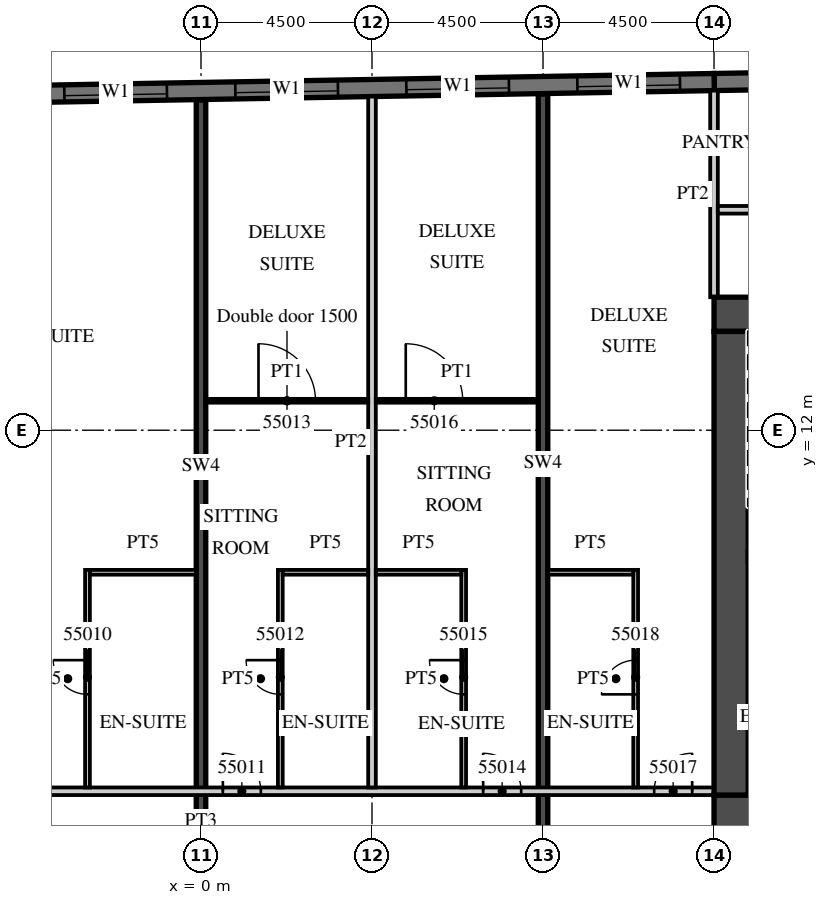
"""IFC4 building model, lengths in metres.
Left out: names, types, materials, properties, quantities, classifications, styles, units other than length and angle.
Written with IfcOpenShell. Run it as: python <this file> out.ifc"""

import sys

from ifc_helpers import new_model, si_unit, direction, frame, frame_2d, origin, place, context, subcontext, project, spatial, rectangle, extrude, element, fill, save


model = new_model("IFC4")
c1 = context("Model", 3, precision=1e-05, world=origin(), true_north=direction((0.0, 1.0)))
c2 = subcontext(c1, "Body", "Model", "MODEL_VIEW")
j1 = project(units=[si_unit("LENGTHUNIT", "METRE"), si_unit("PLANEANGLEUNIT", "RADIAN")], contexts=[c1])
p1 = place(None, origin())
s1 = spatial("IfcSite", under=j1, at=p1, CompositionType="ELEMENT")
p2 = place(p1, origin())
s2 = spatial("IfcBuilding", under=s1, at=p2, CompositionType="ELEMENT")
p3 = place(p2, frame((0.0, 0.0, 227.6)))
s3 = spatial("IfcBuildingStorey", under=s2, at=p3, CompositionType="ELEMENT", Elevation=227.6)
p4 = place(p3, frame((0.0, 1.4, 0.0), z_axis=(0.0, 0.0, 1.0), x_axis=(0.0, 1.0, 0.0)))
e1 = element("IfcWall", 1, at=p4, inside=s3, PredefinedType="SHEAR", context=c2, shape_type="SweptSolid", body=[
    extrude(rectangle(XDim=19.289, YDim=0.25, at=frame_2d((9.644, 0.0))), origin(), (0.0, 0.0, 1.0), 3.3),
])
p5 = place(p3, frame((9.0, 1.4, 0.0), z_axis=(0.0, 0.0, 1.0), x_axis=(0.0, 1.0, 0.0)))
e2 = element("IfcWall", 2, at=p5, inside=s3, PredefinedType="SHEAR", context=c2, shape_type="SweptSolid", body=[
    extrude(rectangle(XDim=19.446, YDim=0.25, at=frame_2d((9.723, 0.0))), origin(), (0.0, 0.0, 1.0), 3.3),
])
p6 = place(p3, frame((31.504, 21.476, 0.0), z_axis=(0.0, 0.0, 1.0), x_axis=(-0.999847677887, -0.017453395744, 0.0)))
e3 = element("IfcWall", 3, at=p6, inside=s3, PredefinedType="SOLIDWALL", context=c2, shape_type="SweptSolid", body=[
    extrude(rectangle(XDim=18.003, YDim=0.45, at=frame_2d((9.001, 0.0))), origin(), (0.0, 0.0, 1.0), 3.02),
])
p7 = place(p3, frame((13.504, 21.161, 0.0), z_axis=(0.0, 0.0, 1.0), x_axis=(-0.999847763257, -0.017448504532, 0.0)))
e4 = element("IfcWall", 4, at=p7, inside=s3, PredefinedType="SOLIDWALL", context=c2, shape_type="SweptSolid", body=[
    extrude(rectangle(XDim=46.859, YDim=0.45, at=frame_2d((23.43, 0.0))), origin(), (0.0, 0.0, 1.0), 3.02),
])
p8 = place(p7, frame((0.9, 0.0, 0.45)))
e5 = element("IfcOpeningElement", 5, at=p8, cuts=e4, PredefinedType="OPENING", context=c2, shape_type="SweptSolid", body=[
    extrude(rectangle(XDim=2.7, YDim=2.25, at=frame_2d((1.35, 1.125))), frame((0.0, 0.235, 0.0), z_axis=(0.0, -1.0, 0.0), x_axis=(1.0, 0.0, 0.0)), (0.0, 0.0, 1.0), 0.47),
])
p9 = place(p7, frame((5.401, 0.0, 0.45)))
e6 = element("IfcOpeningElement", 6, at=p9, cuts=e4, PredefinedType="OPENING", context=c2, shape_type="SweptSolid", body=[
    extrude(rectangle(XDim=2.7, YDim=2.25, at=frame_2d((1.35, 1.125))), frame((0.0, 0.235, 0.0), z_axis=(0.0, -1.0, 0.0), x_axis=(1.0, 0.0, 0.0)), (0.0, 0.0, 1.0), 0.47),
])
p10 = place(p7, frame((9.902, 0.0, 0.45)))
e7 = element("IfcOpeningElement", 7, at=p10, cuts=e4, PredefinedType="OPENING", context=c2, shape_type="SweptSolid", body=[
    extrude(rectangle(XDim=2.7, YDim=2.25, at=frame_2d((1.35, 1.125))), frame((0.0, 0.235, 0.0), z_axis=(0.0, -1.0, 0.0), x_axis=(1.0, 0.0, 0.0)), (0.0, 0.0, 1.0), 0.47),
])
p11 = place(p7, frame((14.402, 0.0, 0.45)))
e8 = element("IfcOpeningElement", 8, at=p11, cuts=e4, PredefinedType="OPENING", context=c2, shape_type="SweptSolid", body=[
    extrude(rectangle(XDim=2.7, YDim=2.25, at=frame_2d((1.35, 1.125))), frame((0.0, 0.235, 0.0), z_axis=(0.0, -1.0, 0.0), x_axis=(1.0, 0.0, 0.0)), (0.0, 0.0, 1.0), 0.47),
])
p12 = place(p7, frame((18.903, 0.0, 0.45)))
e9 = element("IfcOpeningElement", 9, at=p12, cuts=e4, PredefinedType="OPENING", context=c2, shape_type="SweptSolid", body=[
    extrude(rectangle(XDim=2.7, YDim=2.25, at=frame_2d((1.35, 1.125))), frame((0.0, 0.235, 0.0), z_axis=(0.0, -1.0, 0.0), x_axis=(1.0, 0.0, 0.0)), (0.0, 0.0, 1.0), 0.47),
])
p13 = place(p7, frame((23.404, 0.0, 0.45)))
e10 = element("IfcOpeningElement", 10, at=p13, cuts=e4, PredefinedType="OPENING", context=c2, shape_type="SweptSolid", body=[
    extrude(rectangle(XDim=2.7, YDim=2.25, at=frame_2d((1.35, 1.125))), frame((0.0, 0.235, 0.0), z_axis=(0.0, -1.0, 0.0), x_axis=(1.0, 0.0, 0.0)), (0.0, 0.0, 1.0), 0.47),
])
p14 = place(p7, frame((27.904, 0.0, 0.45)))
e11 = element("IfcOpeningElement", 11, at=p14, cuts=e4, PredefinedType="OPENING", context=c2, shape_type="SweptSolid", body=[
    extrude(rectangle(XDim=2.7, YDim=2.25, at=frame_2d((1.35, 1.125))), frame((0.0, 0.235, 0.0), z_axis=(0.0, -1.0, 0.0), x_axis=(1.0, 0.0, 0.0)), (0.0, 0.0, 1.0), 0.47),
])
p15 = place(p7, frame((32.405, 0.0, 0.45)))
e12 = element("IfcOpeningElement", 12, at=p15, cuts=e4, PredefinedType="OPENING", context=c2, shape_type="SweptSolid", body=[
    extrude(rectangle(XDim=2.7, YDim=2.25, at=frame_2d((1.35, 1.125))), frame((0.0, 0.235, 0.0), z_axis=(0.0, -1.0, 0.0), x_axis=(1.0, 0.0, 0.0)), (0.0, 0.0, 1.0), 0.47),
])
p16 = place(p7, frame((36.906, 0.0, 0.45)))
e13 = element("IfcOpeningElement", 13, at=p16, cuts=e4, PredefinedType="OPENING", context=c2, shape_type="SweptSolid", body=[
    extrude(rectangle(XDim=2.7, YDim=2.25, at=frame_2d((1.35, 1.125))), frame((0.0, 0.235, 0.0), z_axis=(0.0, -1.0, 0.0), x_axis=(1.0, 0.0, 0.0)), (0.0, 0.0, 1.0), 0.47),
])
p17 = place(p7, frame((41.406, 0.0, 0.45)))
e14 = element("IfcOpeningElement", 14, at=p17, cuts=e4, PredefinedType="OPENING", context=c2, shape_type="SweptSolid", body=[
    extrude(rectangle(XDim=2.7, YDim=2.25, at=frame_2d((1.35, 1.125))), frame((0.0, 0.235, 0.0), z_axis=(0.0, -1.0, 0.0), x_axis=(1.0, 0.0, 0.0)), (0.0, 0.0, 1.0), 0.47),
])
p18 = place(p3, frame((13.5, 15.5, 0.0), z_axis=(0.0, 0.0, 1.0), x_axis=(0.0, 1.0, 0.0)))
e15 = element("IfcWall", 15, at=p18, inside=s3, PredefinedType="PARTITIONING", context=c2, shape_type="SweptSolid", body=[
    extrude(rectangle(XDim=5.436, YDim=0.2, at=frame_2d((2.718, 0.0))), origin(), (0.0, 0.0, 1.0), 3.02),
])
p19 = place(p3, frame((-13.5, 2.5, 0.0), z_axis=(0.0, 0.0, 1.0), x_axis=(1.0, 0.0, 0.0)))
e16 = element("IfcWall", 16, at=p19, inside=s3, PredefinedType="PARTITIONING", context=c2, shape_type="SweptSolid", body=[
    extrude(rectangle(XDim=27.0, YDim=0.2, at=frame_2d((13.5, 0.0))), origin(), (0.0, 0.0, 1.0), 3.02),
])
p20 = place(p19, frame((2.925, 0.0, 0.0)))
e17 = element("IfcOpeningElement", 17, at=p20, cuts=e16, PredefinedType="OPENING", context=c2, shape_type="SweptSolid", body=[
    extrude(rectangle(XDim=1.0, YDim=2.1, at=frame_2d((0.5, 1.05))), frame((0.0, 0.11, 0.0), z_axis=(0.0, -1.0, 0.0), x_axis=(1.0, 0.0, 0.0)), (0.0, 0.0, 1.0), 0.22),
])
p21 = place(p19, frame((6.938, 0.0, 0.0)))
e18 = element("IfcOpeningElement", 18, at=p21, cuts=e16, PredefinedType="OPENING", context=c2, shape_type="SweptSolid", body=[
    extrude(rectangle(XDim=1.2, YDim=2.1, at=frame_2d((0.6, 1.05))), frame((0.0, 0.11, 0.0), z_axis=(0.0, -1.0, 0.0), x_axis=(1.0, 0.0, 0.0)), (0.0, 0.0, 1.0), 0.22),
])
p22 = place(p19, frame((14.075, 0.0, 0.0)))
e19 = element("IfcOpeningElement", 19, at=p22, cuts=e16, PredefinedType="OPENING", context=c2, shape_type="SweptSolid", body=[
    extrude(rectangle(XDim=1.0, YDim=2.1, at=frame_2d((0.5, 1.05))), frame((0.0, 0.11, 0.0), z_axis=(0.0, -1.0, 0.0), x_axis=(1.0, 0.0, 0.0)), (0.0, 0.0, 1.0), 0.22),
])
p23 = place(p19, frame((20.925, 0.0, 0.0)))
e20 = element("IfcOpeningElement", 20, at=p23, cuts=e16, PredefinedType="OPENING", context=c2, shape_type="SweptSolid", body=[
    extrude(rectangle(XDim=1.0, YDim=2.1, at=frame_2d((0.5, 1.05))), frame((0.0, 0.11, 0.0), z_axis=(0.0, -1.0, 0.0), x_axis=(1.0, 0.0, 0.0)), (0.0, 0.0, 1.0), 0.22),
])
p24 = place(p19, frame((25.425, 0.0, 0.0)))
e21 = element("IfcOpeningElement", 21, at=p24, cuts=e16, PredefinedType="OPENING", context=c2, shape_type="SweptSolid", body=[
    extrude(rectangle(XDim=1.0, YDim=2.1, at=frame_2d((0.5, 1.05))), frame((0.0, 0.11, 0.0), z_axis=(0.0, -1.0, 0.0), x_axis=(1.0, 0.0, 0.0)), (0.0, 0.0, 1.0), 0.22),
])
p25 = place(p3, frame((-2.987, 2.6, 0.0), z_axis=(0.0, 0.0, 1.0), x_axis=(0.0, 1.0, 0.0)))
e22 = element("IfcWall", 22, at=p25, inside=s3, PredefinedType="PARTITIONING", context=c2, shape_type="SweptSolid", body=[
    extrude(rectangle(XDim=5.725, YDim=0.125, at=frame_2d((2.862, 0.0))), origin(), (0.0, 0.0, 1.0), 3.02),
])
p26 = place(p25, frame((2.45, 0.0, 0.0)))
e23 = element("IfcOpeningElement", 23, at=p26, cuts=e22, PredefinedType="OPENING", context=c2, shape_type="SweptSolid", body=[
    extrude(rectangle(XDim=0.9, YDim=2.1, at=frame_2d((0.45, 1.05))), frame((0.0, 0.073, 0.0), z_axis=(0.0, -1.0, 0.0), x_axis=(1.0, 0.0, 0.0)), (0.0, 0.0, 1.0), 0.145),
])
p27 = place(p3, frame((-2.925, 8.262, 0.0), z_axis=(0.0, 0.0, 1.0), x_axis=(1.0, 0.0, 0.0)))
e24 = element("IfcWall", 24, at=p27, inside=s3, PredefinedType="PARTITIONING", context=c2, shape_type="SweptSolid", body=[
    extrude(rectangle(XDim=2.8, YDim=0.125, at=frame_2d((1.4, 0.0))), origin(), (0.0, 0.0, 1.0), 3.02),
])
p28 = place(p3, frame((4.5, 2.6, 0.0), z_axis=(0.0, 0.0, 1.0), x_axis=(0.0, 1.0, 0.0)))
e25 = element("IfcWall", 25, at=p28, inside=s3, PredefinedType="PARTITIONING", context=c2, shape_type="SweptSolid", body=[
    extrude(rectangle(XDim=18.179, YDim=0.2, at=frame_2d((9.089, 0.0))), origin(), (0.0, 0.0, 1.0), 3.02),
])
p29 = place(p3, frame((2.087, 2.6, 0.0), z_axis=(0.0, 0.0, 1.0), x_axis=(0.0, 1.0, 0.0)))
e26 = element("IfcWall", 26, at=p29, inside=s3, PredefinedType="PARTITIONING", context=c2, shape_type="SweptSolid", body=[
    extrude(rectangle(XDim=5.725, YDim=0.125, at=frame_2d((2.862, 0.0))), origin(), (0.0, 0.0, 1.0), 3.02),
])
p30 = place(p29, frame((2.45, 0.0, 0.0)))
e27 = element("IfcOpeningElement", 27, at=p30, cuts=e26, PredefinedType="OPENING", context=c2, shape_type="SweptSolid", body=[
    extrude(rectangle(XDim=0.9, YDim=2.1, at=frame_2d((0.45, 1.05))), frame((0.0, 0.073, 0.0), z_axis=(0.0, -1.0, 0.0), x_axis=(1.0, 0.0, 0.0)), (0.0, 0.0, 1.0), 0.145),
])
p31 = place(p3, frame((2.15, 8.262, 0.0), z_axis=(0.0, 0.0, 1.0), x_axis=(1.0, 0.0, 0.0)))
e28 = element("IfcWall", 28, at=p31, inside=s3, PredefinedType="PARTITIONING", context=c2, shape_type="SweptSolid", body=[
    extrude(rectangle(XDim=2.25, YDim=0.125, at=frame_2d((1.125, 0.0))), origin(), (0.0, 0.0, 1.0), 3.02),
])
p32 = place(p3, frame((0.125, 12.775, 0.0), z_axis=(0.0, 0.0, 1.0), x_axis=(1.0, 0.0, 0.0)))
e29 = element("IfcWall", 29, at=p32, inside=s3, PredefinedType="PARTITIONING", context=c2, shape_type="SweptSolid", body=[
    extrude(rectangle(XDim=4.275, YDim=0.1, at=frame_2d((2.137, 0.0))), origin(), (0.0, 0.0, 1.0), 3.02),
])
p33 = place(p32, frame((1.388, 0.0, 0.0)))
e30 = element("IfcOpeningElement", 30, at=p33, cuts=e29, PredefinedType="OPENING", context=c2, shape_type="SweptSolid", body=[
    extrude(rectangle(XDim=1.5, YDim=2.1, at=frame_2d((0.75, 1.05))), frame((0.0, 0.06, 0.0), z_axis=(0.0, -1.0, 0.0), x_axis=(1.0, 0.0, 0.0)), (0.0, 0.0, 1.0), 0.12),
])
p34 = place(p3, frame((6.912, 2.6, 0.0), z_axis=(0.0, 0.0, 1.0), x_axis=(0.0, 1.0, 0.0)))
e31 = element("IfcWall", 31, at=p34, inside=s3, PredefinedType="PARTITIONING", context=c2, shape_type="SweptSolid", body=[
    extrude(rectangle(XDim=5.725, YDim=0.125, at=frame_2d((2.862, 0.0))), origin(), (0.0, 0.0, 1.0), 3.02),
])
p35 = place(p34, frame((2.45, 0.0, 0.0)))
e32 = element("IfcOpeningElement", 32, at=p35, cuts=e31, PredefinedType="OPENING", context=c2, shape_type="SweptSolid", body=[
    extrude(rectangle(XDim=0.9, YDim=2.1, at=frame_2d((0.45, 1.05))), frame((0.0, 0.073, 0.0), z_axis=(0.0, -1.0, 0.0), x_axis=(1.0, 0.0, 0.0)), (0.0, 0.0, 1.0), 0.145),
])
p36 = place(p3, frame((4.6, 8.262, 0.0), z_axis=(0.0, 0.0, 1.0), x_axis=(1.0, 0.0, 0.0)))
e33 = element("IfcWall", 33, at=p36, inside=s3, PredefinedType="PARTITIONING", context=c2, shape_type="SweptSolid", body=[
    extrude(rectangle(XDim=2.25, YDim=0.125, at=frame_2d((1.125, 0.0))), origin(), (0.0, 0.0, 1.0), 3.02),
])
p37 = place(p3, frame((4.6, 12.775, 0.0), z_axis=(0.0, 0.0, 1.0), x_axis=(1.0, 0.0, 0.0)))
e34 = element("IfcWall", 34, at=p37, inside=s3, PredefinedType="PARTITIONING", context=c2, shape_type="SweptSolid", body=[
    extrude(rectangle(XDim=4.275, YDim=0.1, at=frame_2d((2.137, 0.0))), origin(), (0.0, 0.0, 1.0), 3.02),
])
p38 = place(p37, frame((0.788, 0.0, 0.0)))
e35 = element("IfcOpeningElement", 35, at=p38, cuts=e34, PredefinedType="OPENING", context=c2, shape_type="SweptSolid", body=[
    extrude(rectangle(XDim=1.5, YDim=2.1, at=frame_2d((0.75, 1.05))), frame((0.0, 0.06, 0.0), z_axis=(0.0, -1.0, 0.0), x_axis=(1.0, 0.0, 0.0)), (0.0, 0.0, 1.0), 0.12),
])
p39 = place(p3, frame((11.438, 2.6, 0.0), z_axis=(0.0, 0.0, 1.0), x_axis=(0.0, 1.0, 0.0)))
e36 = element("IfcWall", 36, at=p39, inside=s3, PredefinedType="PARTITIONING", context=c2, shape_type="SweptSolid", body=[
    extrude(rectangle(XDim=5.725, YDim=0.125, at=frame_2d((2.862, 0.0))), origin(), (0.0, 0.0, 1.0), 3.02),
])
p40 = place(p39, frame((2.45, 0.0, 0.0)))
e37 = element("IfcOpeningElement", 37, at=p40, cuts=e36, PredefinedType="OPENING", context=c2, shape_type="SweptSolid", body=[
    extrude(rectangle(XDim=0.9, YDim=2.1, at=frame_2d((0.45, 1.05))), frame((0.0, 0.073, 0.0), z_axis=(0.0, -1.0, 0.0), x_axis=(1.0, 0.0, 0.0)), (0.0, 0.0, 1.0), 0.145),
])
p41 = place(p3, frame((9.125, 8.262, 0.0), z_axis=(0.0, 0.0, 1.0), x_axis=(1.0, 0.0, 0.0)))
e38 = element("IfcWall", 38, at=p41, inside=s3, PredefinedType="PARTITIONING", context=c2, shape_type="SweptSolid", body=[
    extrude(rectangle(XDim=2.25, YDim=0.125, at=frame_2d((1.125, 0.0))), origin(), (0.0, 0.0, 1.0), 3.02),
])
p42 = place(p3, frame((13.5, 1.95, 0.0), z_axis=(0.0, 0.0, 1.0), x_axis=(1.0, 0.0, 0.0)))
e39 = element("IfcWall", 39, at=p42, inside=s3, PredefinedType="SHEAR", context=c2, shape_type="SweptSolid", body=[
    extrude(rectangle(XDim=18.0, YDim=0.9, at=frame_2d((9.0, 0.0))), origin(), (0.0, 0.0, 1.0), 3.02),
])
p43 = place(p42, frame((1.475, 0.0, 0.0)))
e40 = element("IfcOpeningElement", 40, at=p43, cuts=e39, PredefinedType="OPENING", context=c2, shape_type="SweptSolid", body=[
    extrude(rectangle(XDim=1.8, YDim=2.1, at=frame_2d((0.9, 1.05))), frame((0.0, 0.46, 0.0), z_axis=(0.0, -1.0, 0.0), x_axis=(1.0, 0.0, 0.0)), (0.0, 0.0, 1.0), 0.92),
])
p44 = place(p3, frame((13.5, 15.05, 0.0), z_axis=(0.0, 0.0, 1.0), x_axis=(1.0, 0.0, 0.0)))
e41 = element("IfcWall", 41, at=p44, inside=s3, PredefinedType="SHEAR", context=c2, shape_type="SweptSolid", body=[
    extrude(rectangle(XDim=6.8, YDim=0.9, at=frame_2d((3.4, 0.0))), origin(), (0.0, 0.0, 1.0), 3.02),
])
p45 = place(p44, frame((4.725, 0.0, 0.0)))
e42 = element("IfcOpeningElement", 42, at=p45, cuts=e41, PredefinedType="OPENING", context=c2, shape_type="SweptSolid", body=[
    extrude(rectangle(XDim=1.2, YDim=2.1, at=frame_2d((0.6, 1.05))), frame((0.0, 0.46, 0.0), z_axis=(0.0, -1.0, 0.0), x_axis=(1.0, 0.0, 0.0)), (0.0, 0.0, 1.0), 0.92),
])
p46 = place(p3, frame((13.95, 2.4, 0.0), z_axis=(0.0, 0.0, 1.0), x_axis=(0.0, 1.0, 0.0)))
e43 = element("IfcWall", 43, at=p46, inside=s3, PredefinedType="SHEAR", context=c2, shape_type="SweptSolid", body=[
    extrude(rectangle(XDim=12.2, YDim=0.9, at=frame_2d((6.1, 0.0))), origin(), (0.0, 0.0, 1.0), 3.02),
])
p47 = place(p3, frame((13.6, 17.8, 0.0), z_axis=(0.0, 0.0, 1.0), x_axis=(1.0, 0.0, 0.0)))
e44 = element("IfcWall", 44, at=p47, inside=s3, PredefinedType="PARTITIONING", context=c2, shape_type="SweptSolid", body=[
    extrude(rectangle(XDim=28.657, YDim=0.2, at=frame_2d((14.329, 0.0))), origin(), (0.0, 0.0, 1.0), 3.02),
])
p48 = place(p47, frame((15.012, 0.0, 0.0)))
e45 = element("IfcOpeningElement", 45, at=p48, cuts=e44, PredefinedType="OPENING", context=c2, shape_type="SweptSolid", body=[
    extrude(rectangle(XDim=0.9, YDim=2.1, at=frame_2d((0.45, 1.05))), frame((0.0, 0.11, 0.0), z_axis=(0.0, -1.0, 0.0), x_axis=(1.0, 0.0, 0.0)), (0.0, 0.0, 1.0), 0.22),
])
p49 = place(p47, frame((6.712, 0.0, 0.0)))
e46 = element("IfcOpeningElement", 46, at=p49, cuts=e44, PredefinedType="OPENING", context=c2, shape_type="SweptSolid", body=[
    extrude(rectangle(XDim=0.9, YDim=2.1, at=frame_2d((0.45, 1.05))), frame((0.0, 0.11, 0.0), z_axis=(0.0, -1.0, 0.0), x_axis=(1.0, 0.0, 0.0)), (0.0, 0.0, 1.0), 0.22),
])
p50 = place(p8, origin())
e47 = element("IfcWindow", 47, at=p50, inside=s3, PartitioningType="SINGLE_PANEL", PredefinedType="WINDOW", context=c2, shape_type="SweptSolid", body=[
    extrude(rectangle(XDim=2.7, YDim=2.25, at=frame_2d((1.35, 1.125))), frame((0.0, 0.09, 0.0), z_axis=(0.0, -1.0, 0.0), x_axis=(1.0, 0.0, 0.0)), (0.0, 0.0, 1.0), 0.06),
])
fill(e5, e47)
p51 = place(p9, origin())
e48 = element("IfcWindow", 48, at=p51, inside=s3, PartitioningType="SINGLE_PANEL", PredefinedType="WINDOW", context=c2, shape_type="SweptSolid", body=[
    extrude(rectangle(XDim=2.7, YDim=2.25, at=frame_2d((1.35, 1.125))), frame((0.0, 0.09, 0.0), z_axis=(0.0, -1.0, 0.0), x_axis=(1.0, 0.0, 0.0)), (0.0, 0.0, 1.0), 0.06),
])
fill(e6, e48)
p52 = place(p10, origin())
e49 = element("IfcWindow", 49, at=p52, inside=s3, PartitioningType="SINGLE_PANEL", PredefinedType="WINDOW", context=c2, shape_type="SweptSolid", body=[
    extrude(rectangle(XDim=2.7, YDim=2.25, at=frame_2d((1.35, 1.125))), frame((0.0, 0.09, 0.0), z_axis=(0.0, -1.0, 0.0), x_axis=(1.0, 0.0, 0.0)), (0.0, 0.0, 1.0), 0.06),
])
fill(e7, e49)
p53 = place(p11, origin())
e50 = element("IfcWindow", 50, at=p53, inside=s3, PartitioningType="SINGLE_PANEL", PredefinedType="WINDOW", context=c2, shape_type="SweptSolid", body=[
    extrude(rectangle(XDim=2.7, YDim=2.25, at=frame_2d((1.35, 1.125))), frame((0.0, 0.09, 0.0), z_axis=(0.0, -1.0, 0.0), x_axis=(1.0, 0.0, 0.0)), (0.0, 0.0, 1.0), 0.06),
])
fill(e8, e50)
p54 = place(p26, origin())
e51 = element("IfcDoor", 51, at=p54, inside=s3, OperationType="SINGLE_SWING_RIGHT", PredefinedType="DOOR", context=c2, shape_type="SweptSolid", body=[
    extrude(rectangle(XDim=0.9, YDim=2.1, at=frame_2d((0.45, 1.05))), frame((0.0, 0.025, 0.0), z_axis=(0.0, -1.0, 0.0), x_axis=(1.0, 0.0, 0.0)), (0.0, 0.0, 1.0), 0.05),
])
fill(e23, e51)
p55 = place(p22, origin())
e52 = element("IfcDoor", 52, at=p55, inside=s3, OperationType="SINGLE_SWING_LEFT", PredefinedType="DOOR", context=c2, shape_type="SweptSolid", body=[
    extrude(rectangle(XDim=1.0, YDim=2.1, at=frame_2d((0.5, 1.05))), frame((0.0, 0.025, 0.0), z_axis=(0.0, -1.0, 0.0), x_axis=(1.0, 0.0, 0.0)), (0.0, 0.0, 1.0), 0.05),
])
fill(e19, e52)
p56 = place(p30, origin())
e53 = element("IfcDoor", 53, at=p56, inside=s3, OperationType="SINGLE_SWING_RIGHT", PredefinedType="DOOR", context=c2, shape_type="SweptSolid", body=[
    extrude(rectangle(XDim=0.9, YDim=2.1, at=frame_2d((0.45, 1.05))), frame((0.0, 0.025, 0.0), z_axis=(0.0, -1.0, 0.0), x_axis=(1.0, 0.0, 0.0)), (0.0, 0.0, 1.0), 0.05),
])
fill(e27, e53)
p57 = place(p33, origin())
e54 = element("IfcDoor", 54, at=p57, inside=s3, OperationType="SINGLE_SWING_LEFT", PredefinedType="DOOR", context=c2, shape_type="SweptSolid", body=[
    extrude(rectangle(XDim=1.5, YDim=2.1, at=frame_2d((0.75, 1.05))), frame((0.0, 0.025, 0.0), z_axis=(0.0, -1.0, 0.0), x_axis=(1.0, 0.0, 0.0)), (0.0, 0.0, 1.0), 0.05),
])
fill(e30, e54)
p58 = place(p23, origin())
e55 = element("IfcDoor", 55, at=p58, inside=s3, OperationType="SINGLE_SWING_LEFT", PredefinedType="DOOR", context=c2, shape_type="SweptSolid", body=[
    extrude(rectangle(XDim=1.0, YDim=2.1, at=frame_2d((0.5, 1.05))), frame((0.0, 0.025, 0.0), z_axis=(0.0, -1.0, 0.0), x_axis=(1.0, 0.0, 0.0)), (0.0, 0.0, 1.0), 0.05),
])
fill(e20, e55)
p59 = place(p35, origin())
e56 = element("IfcDoor", 56, at=p59, inside=s3, OperationType="SINGLE_SWING_RIGHT", PredefinedType="DOOR", context=c2, shape_type="SweptSolid", body=[
    extrude(rectangle(XDim=0.9, YDim=2.1, at=frame_2d((0.45, 1.05))), frame((0.0, 0.025, 0.0), z_axis=(0.0, -1.0, 0.0), x_axis=(1.0, 0.0, 0.0)), (0.0, 0.0, 1.0), 0.05),
])
fill(e32, e56)
p60 = place(p38, origin())
e57 = element("IfcDoor", 57, at=p60, inside=s3, OperationType="SINGLE_SWING_LEFT", PredefinedType="DOOR", context=c2, shape_type="SweptSolid", body=[
    extrude(rectangle(XDim=1.5, YDim=2.1, at=frame_2d((0.75, 1.05))), frame((0.0, 0.025, 0.0), z_axis=(0.0, -1.0, 0.0), x_axis=(1.0, 0.0, 0.0)), (0.0, 0.0, 1.0), 0.05),
])
fill(e35, e57)
p61 = place(p24, origin())
e58 = element("IfcDoor", 58, at=p61, inside=s3, OperationType="SINGLE_SWING_RIGHT", PredefinedType="DOOR", context=c2, shape_type="SweptSolid", body=[
    extrude(rectangle(XDim=1.0, YDim=2.1, at=frame_2d((0.5, 1.05))), frame((0.0, 0.025, 0.0), z_axis=(0.0, -1.0, 0.0), x_axis=(1.0, 0.0, 0.0)), (0.0, 0.0, 1.0), 0.05),
])
fill(e21, e58)
p62 = place(p40, origin())
e59 = element("IfcDoor", 59, at=p62, inside=s3, OperationType="SINGLE_SWING_LEFT", PredefinedType="DOOR", context=c2, shape_type="SweptSolid", body=[
    extrude(rectangle(XDim=0.9, YDim=2.1, at=frame_2d((0.45, 1.05))), frame((0.0, 0.025, 0.0), z_axis=(0.0, -1.0, 0.0), x_axis=(1.0, 0.0, 0.0)), (0.0, 0.0, 1.0), 0.05),
])
fill(e37, e59)
save(model, sys.argv[1])
